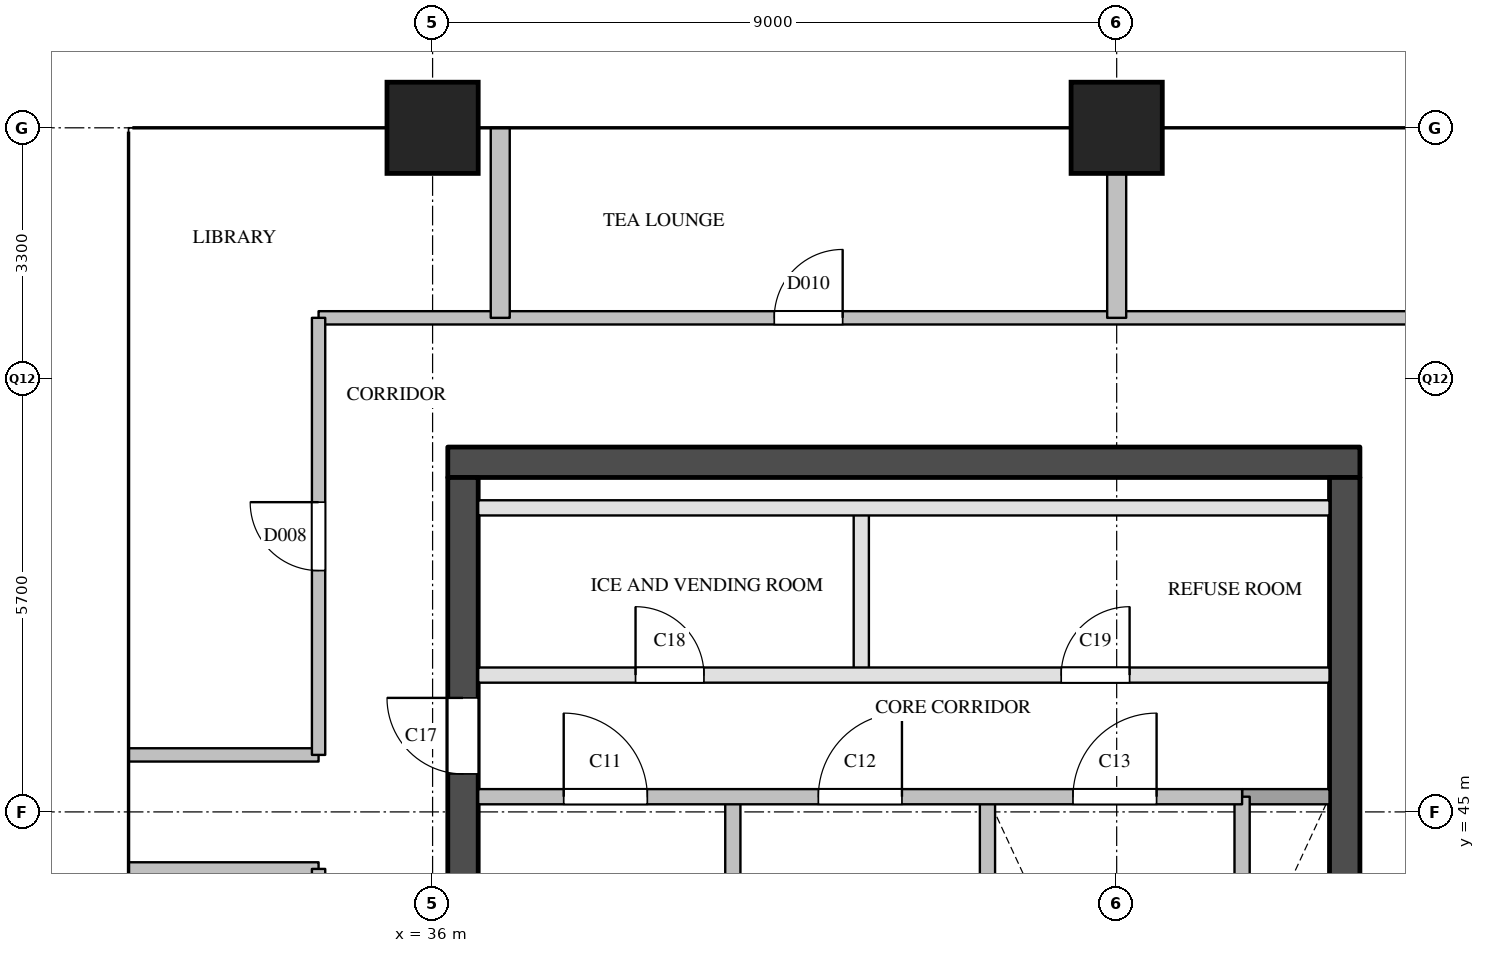
"""IFC4 building model, lengths in metres.
Left out: names, types, materials, properties, quantities, classifications, styles, units other than length and angle.
Written with IfcOpenShell. Run it as: python <this file> out.ifc"""

import sys

from ifc_helpers import new_model, si_unit, direction, frame, frame_2d, origin, origin_2d, place, context, subcontext, project, spatial, rectangle, extrude, element, fill, save


model = new_model("IFC4")
c1 = context("Model", 3, precision=1e-05, world=origin(), true_north=direction((0.0, 1.0)))
c2 = subcontext(c1, "Body", "Model", "MODEL_VIEW")
j1 = project(units=[si_unit("LENGTHUNIT", "METRE"), si_unit("PLANEANGLEUNIT", "RADIAN")], contexts=[c1])
p1 = place(None, origin())
s1 = spatial("IfcSite", under=j1, at=p1, CompositionType="ELEMENT")
p2 = place(p1, origin())
s2 = spatial("IfcBuilding", under=s1, at=p2, CompositionType="ELEMENT")
p3 = place(p2, frame((0.0, 0.0, 215.0)))
s3 = spatial("IfcBuildingStorey", under=s2, at=p3, CompositionType="ELEMENT", Elevation=215.0)
for number, where, z_axis, x_axis in (
    (1, (36.0, 54.0, 0.0), (0.0, 0.0, 1.0), (1.0, 0.0, 0.0)),
    (2, (45.0, 54.0, 0.0), (0.0, 0.0, 1.0), (1.0, 0.0, 0.0)),
):
    element("IfcColumn", number, at=place(p3, frame(where, z_axis=z_axis, x_axis=x_axis)), inside=s3, PredefinedType="COLUMN", context=c2, shape_type="SweptSolid", body=[
        extrude(rectangle(XDim=1.2, YDim=1.2, at=origin_2d()), origin(), (0.0, 0.0, 1.0), 3.9),
    ])
p4 = place(p3, frame((36.2, 49.6, 0.0), z_axis=(0.0, 0.0, 1.0), x_axis=(1.0, 0.0, 0.0)))
e3 = element("IfcWall", 3, at=p4, inside=s3, PredefinedType="SHEAR", context=c2, shape_type="SweptSolid", body=[
    extrude(rectangle(XDim=12.0, YDim=0.4, at=frame_2d((6.0, 0.0))), origin(), (0.0, 0.0, 1.0), 3.6),
])
p5 = place(p3, frame((36.4, 29.1, 0.0), z_axis=(0.0, 0.0, 1.0), x_axis=(0.0, 1.0, 0.0)))
e4 = element("IfcWall", 4, at=p5, inside=s3, PredefinedType="SHEAR", context=c2, shape_type="SweptSolid", body=[
    extrude(rectangle(XDim=20.3, YDim=0.4, at=frame_2d((10.15, 0.0))), origin(), (0.0, 0.0, 1.0), 3.6),
])
p6 = place(p5, frame((3.6, 0.0, 0.0)))
e5 = element("IfcOpeningElement", 5, at=p6, cuts=e4, PredefinedType="OPENING", context=c2, shape_type="SweptSolid", body=[
    extrude(rectangle(XDim=1.8, YDim=2.1, at=frame_2d((0.9, 1.05))), frame((0.0, 0.21, 0.0), z_axis=(0.0, -1.0, 0.0), x_axis=(1.0, 0.0, 0.0)), (0.0, 0.0, 1.0), 0.42),
])
p7 = place(p5, frame((16.4, 0.0, 0.0)))
e6 = element("IfcOpeningElement", 6, at=p7, cuts=e4, PredefinedType="OPENING", context=c2, shape_type="SweptSolid", body=[
    extrude(rectangle(XDim=1.0, YDim=2.1, at=frame_2d((0.5, 1.05))), frame((0.0, 0.21, 0.0), z_axis=(0.0, -1.0, 0.0), x_axis=(1.0, 0.0, 0.0)), (0.0, 0.0, 1.0), 0.42),
])
p8 = place(p3, frame((48.0, 29.1, 0.0), z_axis=(0.0, 0.0, 1.0), x_axis=(0.0, 1.0, 0.0)))
e7 = element("IfcWall", 7, at=p8, inside=s3, PredefinedType="SHEAR", context=c2, shape_type="SweptSolid", body=[
    extrude(rectangle(XDim=20.3, YDim=0.4, at=frame_2d((10.15, 0.0))), origin(), (0.0, 0.0, 1.0), 3.6),
])
p9 = place(p8, frame((12.5, 0.0, 0.0)))
e8 = element("IfcOpeningElement", 8, at=p9, cuts=e7, PredefinedType="OPENING", context=c2, shape_type="SweptSolid", body=[
    extrude(rectangle(XDim=0.7, YDim=2.1, at=frame_2d((0.35, 1.05))), frame((0.0, 0.21, 0.0), z_axis=(0.0, -1.0, 0.0), x_axis=(1.0, 0.0, 0.0)), (0.0, 0.0, 1.0), 0.42),
])
p10 = place(p8, frame((3.9, 0.0, 0.0)))
e9 = element("IfcOpeningElement", 9, at=p10, cuts=e7, PredefinedType="OPENING", context=c2, shape_type="SweptSolid", body=[
    extrude(rectangle(XDim=1.8, YDim=2.1, at=frame_2d((0.9, 1.05))), frame((0.0, 0.21, 0.0), z_axis=(0.0, -1.0, 0.0), x_axis=(1.0, 0.0, 0.0)), (0.0, 0.0, 1.0), 0.42),
])
p11 = place(p3, frame((39.95, 40.78, 0.0), z_axis=(0.0, 0.0, 1.0), x_axis=(0.0, 1.0, 0.0)))
e10 = element("IfcWall", 10, at=p11, inside=s3, PredefinedType="SOLIDWALL", context=c2, shape_type="SweptSolid", body=[
    extrude(rectangle(XDim=4.42, YDim=0.2, at=frame_2d((2.21, 0.0))), origin(), (0.0, 0.0, 1.0), 3.6),
])
p12 = place(p3, frame((41.64, 46.8, 0.0), z_axis=(0.0, 0.0, 1.0), x_axis=(0.0, 1.0, 0.0)))
e11 = element("IfcWall", 11, at=p12, inside=s3, PredefinedType="PARTITIONING", context=c2, shape_type="SweptSolid", body=[
    extrude(rectangle(XDim=2.2, YDim=0.2, at=frame_2d((1.1, 0.0))), origin(), (0.0, 0.0, 1.0), 3.6),
])
for number, where, z_axis, x_axis in (
    (12, (43.3, 40.78, 0.0), (0.0, 0.0, 1.0), (0.0, 1.0, 0.0)),
    (13, (46.65, 40.78, 0.0), (0.0, 0.0, 1.0), (0.0, 1.0, 0.0)),
):
    element("IfcWall", number, at=place(p3, frame(where, z_axis=z_axis, x_axis=x_axis)), inside=s3, PredefinedType="SOLIDWALL", context=c2, shape_type="SweptSolid", body=[
        extrude(rectangle(XDim=4.42, YDim=0.2, at=frame_2d((2.21, 0.0))), origin(), (0.0, 0.0, 1.0), 3.6),
    ])
p13 = place(p3, frame((46.65, 45.2, 0.0), z_axis=(0.0, 0.0, 1.0), x_axis=(1.0, 0.0, 0.0)))
e14 = element("IfcWall", 14, at=p13, inside=s3, PredefinedType="SOLIDWALL", context=c2, shape_type="SweptSolid", body=[
    extrude(rectangle(XDim=1.15, YDim=0.2, at=frame_2d((0.575, 0.0))), origin(), (0.0, 0.0, 1.0), 3.6),
])
p14 = place(p3, frame((36.6, 45.2, 0.0), z_axis=(0.0, 0.0, 1.0), x_axis=(1.0, 0.0, 0.0)))
e15 = element("IfcWall", 15, at=p14, inside=s3, PredefinedType="SOLIDWALL", context=c2, shape_type="SweptSolid", body=[
    extrude(rectangle(XDim=10.05, YDim=0.2, at=frame_2d((5.025, 0.0))), origin(), (0.0, 0.0, 1.0), 3.6),
])
p15 = place(p14, frame((1.125, 0.0, 0.0)))
e16 = element("IfcOpeningElement", 16, at=p15, cuts=e15, PredefinedType="OPENING", context=c2, shape_type="SweptSolid", body=[
    extrude(rectangle(XDim=1.1, YDim=2.1, at=frame_2d((0.55, 1.05))), frame((0.0, 0.11, 0.0), z_axis=(0.0, -1.0, 0.0), x_axis=(1.0, 0.0, 0.0)), (0.0, 0.0, 1.0), 0.22),
])
p16 = place(p14, frame((4.475, 0.0, 0.0)))
e17 = element("IfcOpeningElement", 17, at=p16, cuts=e15, PredefinedType="OPENING", context=c2, shape_type="SweptSolid", body=[
    extrude(rectangle(XDim=1.1, YDim=2.1, at=frame_2d((0.55, 1.05))), frame((0.0, 0.11, 0.0), z_axis=(0.0, -1.0, 0.0), x_axis=(1.0, 0.0, 0.0)), (0.0, 0.0, 1.0), 0.22),
])
p17 = place(p14, frame((7.825, 0.0, 0.0)))
e18 = element("IfcOpeningElement", 18, at=p17, cuts=e15, PredefinedType="OPENING", context=c2, shape_type="SweptSolid", body=[
    extrude(rectangle(XDim=1.1, YDim=2.1, at=frame_2d((0.55, 1.05))), frame((0.0, 0.11, 0.0), z_axis=(0.0, -1.0, 0.0), x_axis=(1.0, 0.0, 0.0)), (0.0, 0.0, 1.0), 0.22),
])
p18 = place(p3, frame((36.6, 46.8, 0.0), z_axis=(0.0, 0.0, 1.0), x_axis=(1.0, 0.0, 0.0)))
e19 = element("IfcWall", 19, at=p18, inside=s3, PredefinedType="PARTITIONING", context=c2, shape_type="SweptSolid", body=[
    extrude(rectangle(XDim=11.2, YDim=0.2, at=frame_2d((5.6, 0.0))), origin(), (0.0, 0.0, 1.0), 3.6),
])
p19 = place(p18, frame((2.07, 0.0, 0.0)))
e20 = element("IfcOpeningElement", 20, at=p19, cuts=e19, PredefinedType="OPENING", context=c2, shape_type="SweptSolid", body=[
    extrude(rectangle(XDim=0.9, YDim=2.1, at=frame_2d((0.45, 1.05))), frame((0.0, 0.11, 0.0), z_axis=(0.0, -1.0, 0.0), x_axis=(1.0, 0.0, 0.0)), (0.0, 0.0, 1.0), 0.22),
])
p20 = place(p18, frame((7.67, 0.0, 0.0)))
e21 = element("IfcOpeningElement", 21, at=p20, cuts=e19, PredefinedType="OPENING", context=c2, shape_type="SweptSolid", body=[
    extrude(rectangle(XDim=0.9, YDim=2.1, at=frame_2d((0.45, 1.05))), frame((0.0, 0.11, 0.0), z_axis=(0.0, -1.0, 0.0), x_axis=(1.0, 0.0, 0.0)), (0.0, 0.0, 1.0), 0.22),
])
p21 = place(p3, frame((36.6, 49.0, 0.0), z_axis=(0.0, 0.0, 1.0), x_axis=(1.0, 0.0, 0.0)))
e22 = element("IfcWall", 22, at=p21, inside=s3, PredefinedType="PARTITIONING", context=c2, shape_type="SweptSolid", body=[
    extrude(rectangle(XDim=11.2, YDim=0.2, at=frame_2d((5.6, 0.0))), origin(), (0.0, 0.0, 1.0), 3.6),
])
for number, where, z_axis, x_axis in (
    (23, (32.0, 44.25, 0.0), (0.0, 0.0, 1.0), (1.0, 0.0, 0.0)),
    (24, (32.0, 45.75, 0.0), (0.0, 0.0, 1.0), (1.0, 0.0, 0.0)),
):
    element("IfcWall", number, at=place(p3, frame(where, z_axis=z_axis, x_axis=x_axis)), inside=s3, PredefinedType="PARTITIONING", context=c2, shape_type="SweptSolid", body=[
        extrude(rectangle(XDim=2.5, YDim=0.175, at=frame_2d((1.25, 0.0))), origin(), (0.0, 0.0, 1.0), 3.6),
    ])
p22 = place(p3, frame((34.5, 51.5, 0.0), z_axis=(0.0, 0.0, 1.0), x_axis=(1.0, 0.0, 0.0)))
e25 = element("IfcWall", 25, at=p22, inside=s3, PredefinedType="PARTITIONING", context=c2, shape_type="SweptSolid", body=[
    extrude(rectangle(XDim=15.4, YDim=0.175, at=frame_2d((7.7, 0.0))), origin(), (0.0, 0.0, 1.0), 3.6),
])
p23 = place(p22, frame((5.995, 0.0, 0.0)))
e26 = element("IfcOpeningElement", 26, at=p23, cuts=e25, PredefinedType="OPENING", context=c2, shape_type="SweptSolid", body=[
    extrude(rectangle(XDim=0.9, YDim=2.1, at=frame_2d((0.45, 1.05))), frame((0.0, 0.097, 0.0), z_axis=(0.0, -1.0, 0.0), x_axis=(1.0, 0.0, 0.0)), (0.0, 0.0, 1.0), 0.195),
])
p24 = place(p3, frame((34.5, 28.5, 0.0), z_axis=(0.0, 0.0, 1.0), x_axis=(0.0, 1.0, 0.0)))
e27 = element("IfcWall", 27, at=p24, inside=s3, PredefinedType="PARTITIONING", context=c2, shape_type="SweptSolid", body=[
    extrude(rectangle(XDim=15.75, YDim=0.175, at=frame_2d((7.875, 0.0))), origin(), (0.0, 0.0, 1.0), 3.6),
])
p25 = place(p24, frame((3.3, 0.0, 0.0)))
e28 = element("IfcOpeningElement", 28, at=p25, cuts=e27, PredefinedType="OPENING", context=c2, shape_type="SweptSolid", body=[
    extrude(rectangle(XDim=0.9, YDim=2.1, at=frame_2d((0.45, 1.05))), frame((0.0, 0.097, 0.0), z_axis=(0.0, -1.0, 0.0), x_axis=(1.0, 0.0, 0.0)), (0.0, 0.0, 1.0), 0.195),
])
p26 = place(p24, frame((11.175, 0.0, 0.0)))
e29 = element("IfcOpeningElement", 29, at=p26, cuts=e27, PredefinedType="OPENING", context=c2, shape_type="SweptSolid", body=[
    extrude(rectangle(XDim=0.9, YDim=2.1, at=frame_2d((0.45, 1.05))), frame((0.0, 0.097, 0.0), z_axis=(0.0, -1.0, 0.0), x_axis=(1.0, 0.0, 0.0)), (0.0, 0.0, 1.0), 0.195),
])
p27 = place(p3, frame((34.5, 45.75, 0.0), z_axis=(0.0, 0.0, 1.0), x_axis=(0.0, 1.0, 0.0)))
e30 = element("IfcWall", 30, at=p27, inside=s3, PredefinedType="PARTITIONING", context=c2, shape_type="SweptSolid", body=[
    extrude(rectangle(XDim=5.75, YDim=0.175, at=frame_2d((2.875, 0.0))), origin(), (0.0, 0.0, 1.0), 3.6),
])
p28 = place(p27, frame((2.425, 0.0, 0.0)))
e31 = element("IfcOpeningElement", 31, at=p28, cuts=e30, PredefinedType="OPENING", context=c2, shape_type="SweptSolid", body=[
    extrude(rectangle(XDim=0.9, YDim=2.1, at=frame_2d((0.45, 1.05))), frame((0.0, 0.097, 0.0), z_axis=(0.0, -1.0, 0.0), x_axis=(1.0, 0.0, 0.0)), (0.0, 0.0, 1.0), 0.195),
])
p29 = place(p3, frame((36.89, 51.5, 0.0), z_axis=(0.0, 0.0, 1.0), x_axis=(0.0, 1.0, 0.0)))
e32 = element("IfcWall", 32, at=p29, inside=s3, PredefinedType="PARTITIONING", context=c2, shape_type="SweptSolid", body=[
    extrude(rectangle(XDim=2.5, YDim=0.25, at=frame_2d((1.25, 0.0))), origin(), (0.0, 0.0, 1.0), 2.6),
])
p30 = place(p3, frame((45.0, 51.5, 0.0), z_axis=(0.0, 0.0, 1.0), x_axis=(0.0, 1.0, 0.0)))
e33 = element("IfcWall", 33, at=p30, inside=s3, PredefinedType="PARTITIONING", context=c2, shape_type="SweptSolid", body=[
    extrude(rectangle(XDim=2.5, YDim=0.25, at=frame_2d((1.25, 0.0))), origin(), (0.0, 0.0, 1.0), 3.6),
])
p31 = place(p15, origin())
e34 = element("IfcDoor", 34, at=p31, inside=s3, OperationType="SINGLE_SWING_LEFT", PredefinedType="DOOR", context=c2, shape_type="SweptSolid", body=[
    extrude(rectangle(XDim=1.1, YDim=2.1, at=frame_2d((0.55, 1.05))), frame((0.0, 0.025, 0.0), z_axis=(0.0, -1.0, 0.0), x_axis=(1.0, 0.0, 0.0)), (0.0, 0.0, 1.0), 0.05),
])
fill(e16, e34)
p32 = place(p16, origin())
e35 = element("IfcDoor", 35, at=p32, inside=s3, OperationType="SINGLE_SWING_RIGHT", PredefinedType="DOOR", context=c2, shape_type="SweptSolid", body=[
    extrude(rectangle(XDim=1.1, YDim=2.1, at=frame_2d((0.55, 1.05))), frame((0.0, 0.025, 0.0), z_axis=(0.0, -1.0, 0.0), x_axis=(1.0, 0.0, 0.0)), (0.0, 0.0, 1.0), 0.05),
])
fill(e17, e35)
p33 = place(p17, origin())
e36 = element("IfcDoor", 36, at=p33, inside=s3, OperationType="SINGLE_SWING_RIGHT", PredefinedType="DOOR", context=c2, shape_type="SweptSolid", body=[
    extrude(rectangle(XDim=1.1, YDim=2.1, at=frame_2d((0.55, 1.05))), frame((0.0, 0.025, 0.0), z_axis=(0.0, -1.0, 0.0), x_axis=(1.0, 0.0, 0.0)), (0.0, 0.0, 1.0), 0.05),
])
fill(e18, e36)
p34 = place(p7, origin())
e37 = element("IfcDoor", 37, at=p34, inside=s3, OperationType="SINGLE_SWING_RIGHT", PredefinedType="DOOR", context=c2, shape_type="SweptSolid", body=[
    extrude(rectangle(XDim=1.0, YDim=2.1, at=frame_2d((0.5, 1.05))), frame((0.0, 0.025, 0.0), z_axis=(0.0, -1.0, 0.0), x_axis=(1.0, 0.0, 0.0)), (0.0, 0.0, 1.0), 0.05),
])
fill(e6, e37)
p35 = place(p19, origin())
e38 = element("IfcDoor", 38, at=p35, inside=s3, OperationType="SINGLE_SWING_LEFT", PredefinedType="DOOR", context=c2, shape_type="SweptSolid", body=[
    extrude(rectangle(XDim=0.9, YDim=2.1, at=frame_2d((0.45, 1.05))), frame((0.0, 0.025, 0.0), z_axis=(0.0, -1.0, 0.0), x_axis=(1.0, 0.0, 0.0)), (0.0, 0.0, 1.0), 0.05),
])
fill(e20, e38)
p36 = place(p20, origin())
e39 = element("IfcDoor", 39, at=p36, inside=s3, OperationType="SINGLE_SWING_RIGHT", PredefinedType="DOOR", context=c2, shape_type="SweptSolid", body=[
    extrude(rectangle(XDim=0.9, YDim=2.1, at=frame_2d((0.45, 1.05))), frame((0.0, 0.025, 0.0), z_axis=(0.0, -1.0, 0.0), x_axis=(1.0, 0.0, 0.0)), (0.0, 0.0, 1.0), 0.05),
])
fill(e21, e39)
p37 = place(p28, origin())
e40 = element("IfcDoor", 40, at=p37, inside=s3, OperationType="SINGLE_SWING_RIGHT", PredefinedType="DOOR", context=c2, shape_type="SweptSolid", body=[
    extrude(rectangle(XDim=0.9, YDim=2.1, at=frame_2d((0.45, 1.05))), frame((0.0, 0.025, 0.0), z_axis=(0.0, -1.0, 0.0), x_axis=(1.0, 0.0, 0.0)), (0.0, 0.0, 1.0), 0.05),
])
fill(e31, e40)
p38 = place(p23, origin())
e41 = element("IfcDoor", 41, at=p38, inside=s3, OperationType="SINGLE_SWING_RIGHT", PredefinedType="DOOR", context=c2, shape_type="SweptSolid", body=[
    extrude(rectangle(XDim=0.9, YDim=2.1, at=frame_2d((0.45, 1.05))), frame((0.0, 0.025, 0.0), z_axis=(0.0, -1.0, 0.0), x_axis=(1.0, 0.0, 0.0)), (0.0, 0.0, 1.0), 0.05),
])
fill(e26, e41)
save(model, sys.argv[1])
